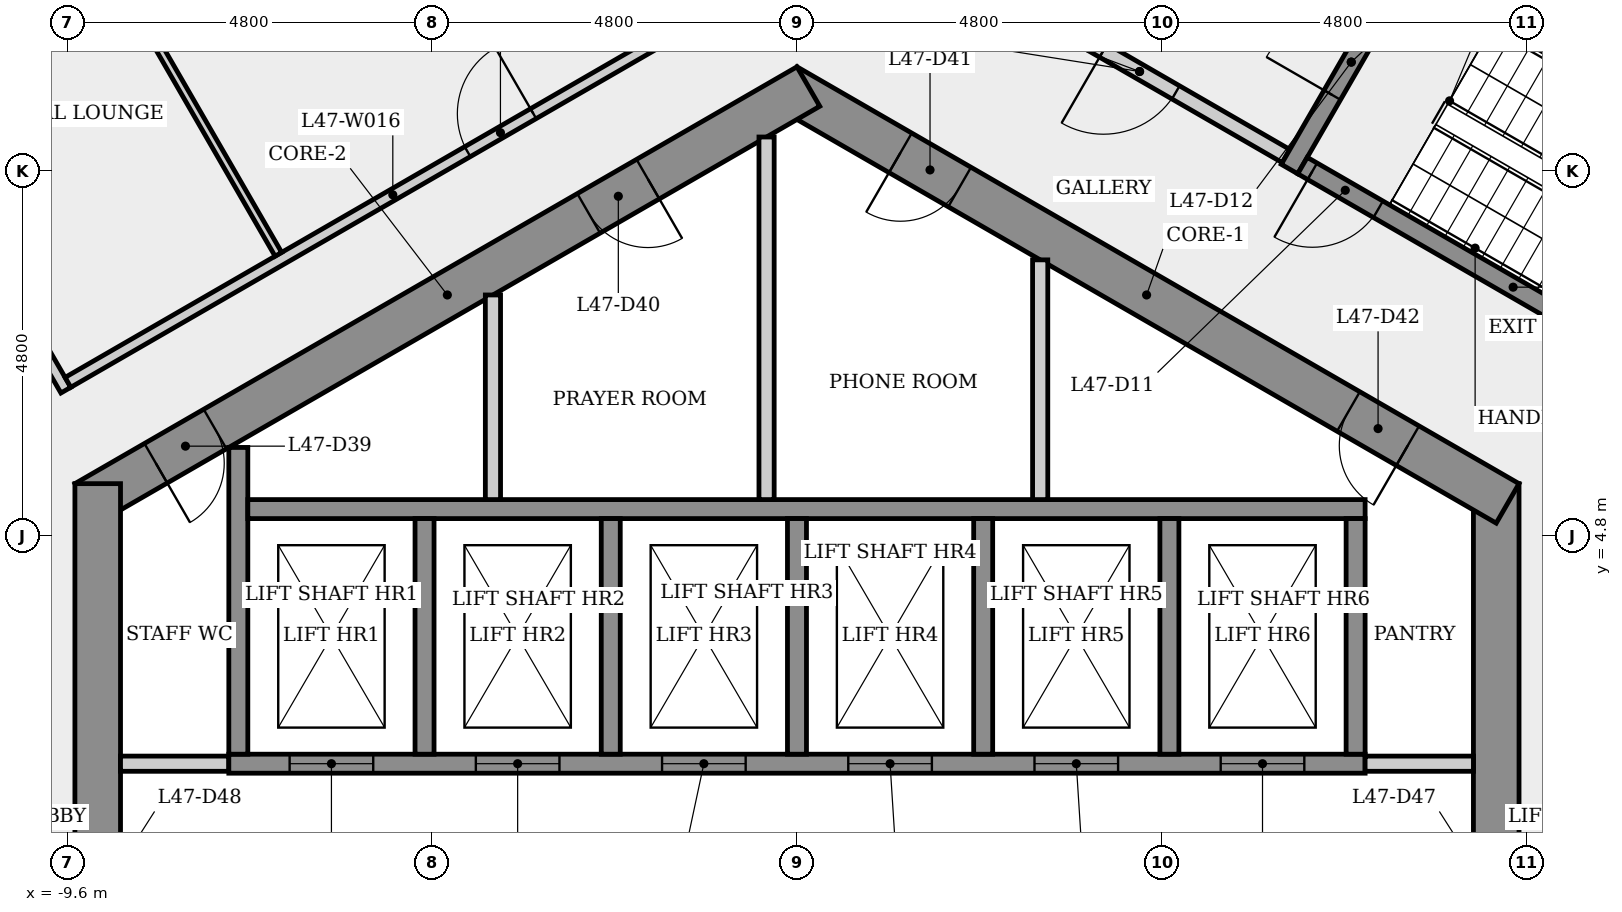
"""IFC4 building model, lengths in metres.
Left out: names, types, materials, properties, quantities, classifications, styles, units other than length and angle.
Written with IfcOpenShell. Run it as: python <this file> out.ifc"""

import sys

from ifc_helpers import new_model, si_unit, direction, frame, frame_2d, origin, place, context, subcontext, project, spatial, rectangle, extrude, element, fill, save


model = new_model("IFC4")
c1 = context("Model", 3, precision=1e-05, world=origin(), true_north=direction((0.0, 1.0)))
c2 = subcontext(c1, "Body", "Model", "MODEL_VIEW")
j1 = project(units=[si_unit("LENGTHUNIT", "METRE"), si_unit("PLANEANGLEUNIT", "RADIAN")], contexts=[c1])
p1 = place(None, origin())
s1 = spatial("IfcSite", under=j1, at=p1, CompositionType="ELEMENT")
p2 = place(p1, origin())
s2 = spatial("IfcBuilding", under=s1, at=p2, CompositionType="ELEMENT")
p3 = place(p2, frame((0.0, 0.0, 176.5)))
s3 = spatial("IfcBuildingStorey", under=s2, at=p3, CompositionType="ELEMENT", Elevation=176.5)
p4 = place(p3, frame((9.2, -5.485, 0.0), z_axis=(0.0, 0.0, 1.0), x_axis=(0.0, 1.0, 0.0)))
e1 = element("IfcWall", 1, at=p4, inside=s3, PredefinedType="SHEAR", context=c2, shape_type="SweptSolid", body=[
    extrude(rectangle(XDim=10.97, YDim=0.6, at=frame_2d((5.485, 0.0))), origin(), (0.0, 0.0, 1.0), 3.4),
])
p5 = place(p4, frame((4.685, 0.0, 0.0)))
e2 = element("IfcOpeningElement", 2, at=p5, cuts=e1, PredefinedType="OPENING", context=c2, shape_type="SweptSolid", body=[
    extrude(rectangle(XDim=1.6, YDim=2.1, at=frame_2d((0.8, 1.05))), frame((0.0, 0.31, 0.0), z_axis=(0.0, -1.0, 0.0), x_axis=(1.0, 0.0, 0.0)), (0.0, 0.0, 1.0), 0.62),
])
p6 = place(p3, frame((9.35, 5.225, 0.0), z_axis=(0.0, 0.0, 1.0), x_axis=(-0.866023993627, 0.500002442456, 0.0)))
e3 = element("IfcWall", 3, at=p6, inside=s3, PredefinedType="SHEAR", context=c2, shape_type="SweptSolid", body=[
    extrude(rectangle(XDim=10.97, YDim=0.6, at=frame_2d((5.485, 0.0))), origin(), (0.0, 0.0, 1.0), 3.4),
])
p7 = place(p6, frame((8.325, 0.0, 0.0)))
e4 = element("IfcOpeningElement", 4, at=p7, cuts=e3, PredefinedType="OPENING", context=c2, shape_type="SweptSolid", body=[
    extrude(rectangle(XDim=0.9, YDim=2.1, at=frame_2d((0.45, 1.05))), frame((0.0, 0.31, 0.0), z_axis=(0.0, -1.0, 0.0), x_axis=(1.0, 0.0, 0.0)), (0.0, 0.0, 1.0), 0.62),
])
p8 = place(p6, frame((1.518, 0.0, 0.0)))
e5 = element("IfcOpeningElement", 5, at=p8, cuts=e3, PredefinedType="OPENING", context=c2, shape_type="SweptSolid", body=[
    extrude(rectangle(XDim=0.9, YDim=2.1, at=frame_2d((0.45, 1.05))), frame((0.0, 0.31, 0.0), z_axis=(0.0, -1.0, 0.0), x_axis=(1.0, 0.0, 0.0)), (0.0, 0.0, 1.0), 0.62),
])
p9 = place(p3, frame((0.15, 10.71, 0.0), z_axis=(0.0, 0.0, 1.0), x_axis=(-0.866023993627, -0.500002442456, 0.0)))
e6 = element("IfcWall", 6, at=p9, inside=s3, PredefinedType="SHEAR", context=c2, shape_type="SweptSolid", body=[
    extrude(rectangle(XDim=10.97, YDim=0.6, at=frame_2d((5.485, 0.0))), origin(), (0.0, 0.0, 1.0), 3.4),
])
p10 = place(p9, frame((9.013, 0.0, 0.0)))
e7 = element("IfcOpeningElement", 7, at=p10, cuts=e6, PredefinedType="OPENING", context=c2, shape_type="SweptSolid", body=[
    extrude(rectangle(XDim=0.9, YDim=2.1, at=frame_2d((0.45, 1.05))), frame((0.0, 0.31, 0.0), z_axis=(0.0, -1.0, 0.0), x_axis=(1.0, 0.0, 0.0)), (0.0, 0.0, 1.0), 0.62),
])
p11 = place(p9, frame((2.437, 0.0, 0.0)))
e8 = element("IfcOpeningElement", 8, at=p11, cuts=e6, PredefinedType="OPENING", context=c2, shape_type="SweptSolid", body=[
    extrude(rectangle(XDim=0.9, YDim=2.1, at=frame_2d((0.45, 1.05))), frame((0.0, 0.31, 0.0), z_axis=(0.0, -1.0, 0.0), x_axis=(1.0, 0.0, 0.0)), (0.0, 0.0, 1.0), 0.62),
])
p12 = place(p3, frame((-9.2, 5.485, 0.0), z_axis=(0.0, 0.0, 1.0), x_axis=(0.0, -1.0, 0.0)))
e9 = element("IfcWall", 9, at=p12, inside=s3, PredefinedType="SHEAR", context=c2, shape_type="SweptSolid", body=[
    extrude(rectangle(XDim=10.97, YDim=0.6, at=frame_2d((5.485, 0.0))), origin(), (0.0, 0.0, 1.0), 3.4),
])
p13 = place(p12, frame((8.516, 0.0, 0.0)))
e10 = element("IfcOpeningElement", 10, at=p13, cuts=e9, PredefinedType="OPENING", context=c2, shape_type="SweptSolid", body=[
    extrude(rectangle(XDim=0.9, YDim=2.1, at=frame_2d((0.45, 1.05))), frame((0.0, 0.31, 0.0), z_axis=(0.0, -1.0, 0.0), x_axis=(1.0, 0.0, 0.0)), (0.0, 0.0, 1.0), 0.62),
])
p14 = place(p12, frame((4.685, 0.0, 0.0)))
e11 = element("IfcOpeningElement", 11, at=p14, cuts=e9, PredefinedType="OPENING", context=c2, shape_type="SweptSolid", body=[
    extrude(rectangle(XDim=1.6, YDim=2.1, at=frame_2d((0.8, 1.05))), frame((0.0, 0.31, 0.0), z_axis=(0.0, -1.0, 0.0), x_axis=(1.0, 0.0, 0.0)), (0.0, 0.0, 1.0), 0.62),
])
p15 = place(p3, frame((-12.127, 11.058, 0.0), z_axis=(0.0, 0.0, 1.0), x_axis=(0.500018842284, -0.866014524914, 0.0)))
e12 = element("IfcWall", 12, at=p15, inside=s3, PredefinedType="PARTITIONING", context=c2, shape_type="SweptSolid", body=[
    extrude(rectangle(XDim=5.015, YDim=0.15, at=frame_2d((2.507, 0.0))), origin(), (0.0, 0.0, 1.0), 3.05),
])
p16 = place(p15, frame((1.97, 0.0, 0.0)))
e13 = element("IfcOpeningElement", 13, at=p16, cuts=e12, PredefinedType="OPENING", context=c2, shape_type="SweptSolid", body=[
    extrude(rectangle(XDim=1.0, YDim=2.1, at=frame_2d((0.5, 1.05))), frame((0.0, 0.085, 0.0), z_axis=(0.0, -1.0, 0.0), x_axis=(1.0, 0.0, 0.0)), (0.0, 0.0, 1.0), 0.17),
])
p17 = place(p3, frame((-9.592, 6.817, 0.0), z_axis=(0.0, 0.0, 1.0), x_axis=(0.866024543535, 0.500001489993, 0.0)))
e14 = element("IfcWall", 14, at=p17, inside=s3, PredefinedType="PARTITIONING", context=c2, shape_type="SweptSolid", body=[
    extrude(rectangle(XDim=9.871, YDim=0.15, at=frame_2d((4.936, 0.0))), origin(), (0.0, 0.0, 1.0), 3.05),
])
p18 = place(p17, frame((6.071, 0.0, 0.0)))
e15 = element("IfcOpeningElement", 15, at=p18, cuts=e14, PredefinedType="OPENING", context=c2, shape_type="SweptSolid", body=[
    extrude(rectangle(XDim=1.0, YDim=2.1, at=frame_2d((0.5, 1.05))), frame((0.0, 0.085, 0.0), z_axis=(0.0, -1.0, 0.0), x_axis=(1.0, 0.0, 0.0)), (0.0, 0.0, 1.0), 0.17),
])
p19 = place(p3, frame((-8.9, 1.8, 0.0), z_axis=(0.0, 0.0, 1.0), x_axis=(1.0, 0.0, 0.0)))
e16 = element("IfcWall", 16, at=p19, inside=s3, PredefinedType="PARTITIONING", context=c2, shape_type="SweptSolid", body=[
    extrude(rectangle(XDim=1.425, YDim=0.2, at=frame_2d((0.712, 0.0))), origin(), (0.0, 0.0, 1.0), 3.05),
])
p20 = place(p3, frame((-7.475, 1.8, 0.0), z_axis=(0.0, 0.0, 1.0), x_axis=(1.0, 0.0, 0.0)))
e17 = element("IfcWall", 17, at=p20, inside=s3, PredefinedType="SHEAR", context=c2, shape_type="SweptSolid", body=[
    extrude(rectangle(XDim=14.95, YDim=0.25, at=frame_2d((7.475, 0.0))), origin(), (0.0, 0.0, 1.0), 3.05),
])
p21 = place(p20, frame((0.8, 0.0, 0.0)))
e18 = element("IfcOpeningElement", 18, at=p21, cuts=e17, PredefinedType="OPENING", context=c2, shape_type="SweptSolid", body=[
    extrude(rectangle(XDim=1.1, YDim=2.1, at=frame_2d((0.55, 1.05))), frame((0.0, 0.135, 0.0), z_axis=(0.0, -1.0, 0.0), x_axis=(1.0, 0.0, 0.0)), (0.0, 0.0, 1.0), 0.27),
])
p22 = place(p20, frame((3.25, 0.0, 0.0)))
e19 = element("IfcOpeningElement", 19, at=p22, cuts=e17, PredefinedType="OPENING", context=c2, shape_type="SweptSolid", body=[
    extrude(rectangle(XDim=1.1, YDim=2.1, at=frame_2d((0.55, 1.05))), frame((0.0, 0.135, 0.0), z_axis=(0.0, -1.0, 0.0), x_axis=(1.0, 0.0, 0.0)), (0.0, 0.0, 1.0), 0.27),
])
p23 = place(p20, frame((5.7, 0.0, 0.0)))
e20 = element("IfcOpeningElement", 20, at=p23, cuts=e17, PredefinedType="OPENING", context=c2, shape_type="SweptSolid", body=[
    extrude(rectangle(XDim=1.1, YDim=2.1, at=frame_2d((0.55, 1.05))), frame((0.0, 0.135, 0.0), z_axis=(0.0, -1.0, 0.0), x_axis=(1.0, 0.0, 0.0)), (0.0, 0.0, 1.0), 0.27),
])
p24 = place(p20, frame((8.15, 0.0, 0.0)))
e21 = element("IfcOpeningElement", 21, at=p24, cuts=e17, PredefinedType="OPENING", context=c2, shape_type="SweptSolid", body=[
    extrude(rectangle(XDim=1.1, YDim=2.1, at=frame_2d((0.55, 1.05))), frame((0.0, 0.135, 0.0), z_axis=(0.0, -1.0, 0.0), x_axis=(1.0, 0.0, 0.0)), (0.0, 0.0, 1.0), 0.27),
])
p25 = place(p20, frame((10.6, 0.0, 0.0)))
e22 = element("IfcOpeningElement", 22, at=p25, cuts=e17, PredefinedType="OPENING", context=c2, shape_type="SweptSolid", body=[
    extrude(rectangle(XDim=1.1, YDim=2.1, at=frame_2d((0.55, 1.05))), frame((0.0, 0.135, 0.0), z_axis=(0.0, -1.0, 0.0), x_axis=(1.0, 0.0, 0.0)), (0.0, 0.0, 1.0), 0.27),
])
p26 = place(p20, frame((13.05, 0.0, 0.0)))
e23 = element("IfcOpeningElement", 23, at=p26, cuts=e17, PredefinedType="OPENING", context=c2, shape_type="SweptSolid", body=[
    extrude(rectangle(XDim=1.1, YDim=2.1, at=frame_2d((0.55, 1.05))), frame((0.0, 0.135, 0.0), z_axis=(0.0, -1.0, 0.0), x_axis=(1.0, 0.0, 0.0)), (0.0, 0.0, 1.0), 0.27),
])
p27 = place(p3, frame((-7.35, 1.925, 0.0), z_axis=(0.0, 0.0, 1.0), x_axis=(0.0, 1.0, 0.0)))
e24 = element("IfcWall", 24, at=p27, inside=s3, PredefinedType="SHEAR", context=c2, shape_type="SweptSolid", body=[
    extrude(rectangle(XDim=4.036, YDim=0.25, at=frame_2d((2.018, 0.0))), origin(), (0.0, 0.0, 1.0), 3.05),
])
p28 = place(p3, frame((-7.225, 5.15, 0.0), z_axis=(0.0, 0.0, 1.0), x_axis=(1.0, 0.0, 0.0)))
e25 = element("IfcWall", 25, at=p28, inside=s3, PredefinedType="SHEAR", context=c2, shape_type="SweptSolid", body=[
    extrude(rectangle(XDim=14.7, YDim=0.25, at=frame_2d((7.35, 0.0))), origin(), (0.0, 0.0, 1.0), 3.05),
])
p29 = place(p3, frame((-6.823, 8.503, 0.0), z_axis=(0.0, 0.0, 1.0), x_axis=(-0.500011399757, 0.866018822032, 0.0)))
e26 = element("IfcWall", 26, at=p29, inside=s3, PredefinedType="PARTITIONING", context=c2, shape_type="SweptSolid", body=[
    extrude(rectangle(XDim=7.411, YDim=0.1, at=frame_2d((3.706, 0.0))), origin(), (0.0, 0.0, 1.0), 3.05),
])
p30 = place(p3, frame((-4.9, 5.025, 0.0), z_axis=(0.0, 0.0, 1.0), x_axis=(0.0, -1.0, 0.0)))
e27 = element("IfcWall", 27, at=p30, inside=s3, PredefinedType="SHEAR", context=c2, shape_type="SweptSolid", body=[
    extrude(rectangle(XDim=3.1, YDim=0.25, at=frame_2d((1.55, 0.0))), origin(), (0.0, 0.0, 1.0), 3.4),
])
p31 = place(p3, frame((-4.0, 7.967, 0.0), z_axis=(0.0, 0.0, 1.0), x_axis=(0.0, -1.0, 0.0)))
e28 = element("IfcWall", 28, at=p31, inside=s3, PredefinedType="PARTITIONING", context=c2, shape_type="SweptSolid", body=[
    extrude(rectangle(XDim=2.692, YDim=0.2, at=frame_2d((1.346, 0.0))), origin(), (0.0, 0.0, 1.0), 3.05),
])
p32 = place(p3, frame((-2.45, 5.025, 0.0), z_axis=(0.0, 0.0, 1.0), x_axis=(0.0, -1.0, 0.0)))
e29 = element("IfcWall", 29, at=p32, inside=s3, PredefinedType="SHEAR", context=c2, shape_type="SweptSolid", body=[
    extrude(rectangle(XDim=3.1, YDim=0.25, at=frame_2d((1.55, 0.0))), origin(), (0.0, 0.0, 1.0), 3.4),
])
p33 = place(p3, frame((-0.4, 10.046, 0.0), z_axis=(0.0, 0.0, 1.0), x_axis=(0.0, -1.0, 0.0)))
e30 = element("IfcWall", 30, at=p33, inside=s3, PredefinedType="PARTITIONING", context=c2, shape_type="SweptSolid", body=[
    extrude(rectangle(XDim=4.771, YDim=0.2, at=frame_2d((2.385, 0.0))), origin(), (0.0, 0.0, 1.0), 3.05),
])
for number, where, z_axis, x_axis in (
    (31, (0.0, 5.025, 0.0), (0.0, 0.0, 1.0), (0.0, -1.0, 0.0)),
    (32, (2.45, 5.025, 0.0), (0.0, 0.0, 1.0), (0.0, -1.0, 0.0)),
):
    element("IfcWall", number, at=place(p3, frame(where, z_axis=z_axis, x_axis=x_axis)), inside=s3, PredefinedType="SHEAR", context=c2, shape_type="SweptSolid", body=[
        extrude(rectangle(XDim=3.1, YDim=0.25, at=frame_2d((1.55, 0.0))), origin(), (0.0, 0.0, 1.0), 3.4),
    ])
p34 = place(p3, frame((3.2, 8.429, 0.0), z_axis=(0.0, 0.0, 1.0), x_axis=(0.0, -1.0, 0.0)))
e33 = element("IfcWall", 33, at=p34, inside=s3, PredefinedType="PARTITIONING", context=c2, shape_type="SweptSolid", body=[
    extrude(rectangle(XDim=3.154, YDim=0.2, at=frame_2d((1.577, 0.0))), origin(), (0.0, 0.0, 1.0), 3.05),
])
p35 = place(p3, frame((4.9, 5.025, 0.0), z_axis=(0.0, 0.0, 1.0), x_axis=(0.0, -1.0, 0.0)))
e34 = element("IfcWall", 34, at=p35, inside=s3, PredefinedType="SHEAR", context=c2, shape_type="SweptSolid", body=[
    extrude(rectangle(XDim=3.1, YDim=0.25, at=frame_2d((1.55, 0.0))), origin(), (0.0, 0.0, 1.0), 3.4),
])
p36 = place(p3, frame((6.435, 9.795, 0.0), z_axis=(0.0, 0.0, 1.0), x_axis=(-0.866012907634, 0.500021643343, 0.0)))
e35 = element("IfcWall", 35, at=p36, inside=s3, PredefinedType="PARTITIONING", context=c2, shape_type="SweptSolid", body=[
    extrude(rectangle(XDim=4.45, YDim=0.2, at=frame_2d((2.225, 0.0))), origin(), (0.0, 0.0, 1.0), 3.05),
])
p37 = place(p36, frame((1.675, 0.0, 0.0)))
e36 = element("IfcOpeningElement", 36, at=p37, cuts=e35, PredefinedType="OPENING", context=c2, shape_type="SweptSolid", body=[
    extrude(rectangle(XDim=1.1, YDim=2.1, at=frame_2d((0.55, 1.05))), frame((0.0, 0.11, 0.0), z_axis=(0.0, -1.0, 0.0), x_axis=(1.0, 0.0, 0.0)), (0.0, 0.0, 1.0), 0.22),
])
p38 = place(p3, frame((6.48, 9.624, 0.0), z_axis=(0.0, 0.0, 1.0), x_axis=(0.500017246033, 0.866015446554, 0.0)))
e37 = element("IfcWall", 37, at=p38, inside=s3, PredefinedType="SHEAR", context=c2, shape_type="SweptSolid", body=[
    extrude(rectangle(XDim=3.25, YDim=0.25, at=frame_2d((1.625, 0.0))), origin(), (0.0, 0.0, 1.0), 3.05),
])
p39 = place(p38, frame((1.125, 0.0, 0.0)))
e38 = element("IfcOpeningElement", 38, at=p39, cuts=e37, PredefinedType="OPENING", context=c2, shape_type="SweptSolid", body=[
    extrude(rectangle(XDim=1.0, YDim=2.1, at=frame_2d((0.5, 1.05))), frame((0.0, 0.135, 0.0), z_axis=(0.0, -1.0, 0.0), x_axis=(1.0, 0.0, 0.0)), (0.0, 0.0, 1.0), 0.27),
])
p40 = place(p3, frame((7.475, 1.8, 0.0), z_axis=(0.0, 0.0, 1.0), x_axis=(1.0, 0.0, 0.0)))
e39 = element("IfcWall", 39, at=p40, inside=s3, PredefinedType="PARTITIONING", context=c2, shape_type="SweptSolid", body=[
    extrude(rectangle(XDim=1.425, YDim=0.2, at=frame_2d((0.712, 0.0))), origin(), (0.0, 0.0, 1.0), 3.05),
])
p41 = place(p3, frame((7.35, 5.025, 0.0), z_axis=(0.0, 0.0, 1.0), x_axis=(0.0, -1.0, 0.0)))
e40 = element("IfcWall", 40, at=p41, inside=s3, PredefinedType="SHEAR", context=c2, shape_type="SweptSolid", body=[
    extrude(rectangle(XDim=3.1, YDim=0.25, at=frame_2d((1.55, 0.0))), origin(), (0.0, 0.0, 1.0), 3.4),
])
p42 = place(p3, frame((8.151, 12.268, 0.0), z_axis=(0.0, 0.0, 1.0), x_axis=(0.866025499775, -0.499999833739, 0.0)))
e41 = element("IfcWall", 41, at=p42, inside=s3, PredefinedType="SHEAR", context=c2, shape_type="SweptSolid", body=[
    extrude(rectangle(XDim=6.4, YDim=0.25, at=frame_2d((3.2, 0.0))), origin(), (0.0, 0.0, 1.0), 3.05),
])
p43 = place(p3, frame((12.194, 6.47, 0.0), z_axis=(0.0, 0.0, 1.0), x_axis=(-0.866025499775, 0.499999833739, 0.0)))
e42 = element("IfcWall", 42, at=p43, inside=s3, PredefinedType="SHEAR", context=c2, shape_type="SweptSolid", body=[
    extrude(rectangle(XDim=6.4, YDim=0.25, at=frame_2d((3.2, 0.0))), origin(), (0.0, 0.0, 1.0), 3.05),
])
p44 = place(p43, frame((5.25, 0.0, 0.0)))
e43 = element("IfcOpeningElement", 43, at=p44, cuts=e42, PredefinedType="OPENING", context=c2, shape_type="SweptSolid", body=[
    extrude(rectangle(XDim=1.0, YDim=2.1, at=frame_2d((0.5, 1.05))), frame((0.0, 0.135, 0.0), z_axis=(0.0, -1.0, 0.0), x_axis=(1.0, 0.0, 0.0)), (0.0, 0.0, 1.0), 0.27),
])
p45 = place(p21, origin())
e44 = element("IfcDoor", 44, at=p45, inside=s3, OperationType="SLIDING_TO_LEFT", PredefinedType="DOOR", context=c2, shape_type="SweptSolid", body=[
    extrude(rectangle(XDim=1.1, YDim=2.1, at=frame_2d((0.55, 1.05))), frame((0.0, 0.025, 0.0), z_axis=(0.0, -1.0, 0.0), x_axis=(1.0, 0.0, 0.0)), (0.0, 0.0, 1.0), 0.05),
])
fill(e18, e44)
p46 = place(p22, origin())
e45 = element("IfcDoor", 45, at=p46, inside=s3, OperationType="SLIDING_TO_LEFT", PredefinedType="DOOR", context=c2, shape_type="SweptSolid", body=[
    extrude(rectangle(XDim=1.1, YDim=2.1, at=frame_2d((0.55, 1.05))), frame((0.0, 0.025, 0.0), z_axis=(0.0, -1.0, 0.0), x_axis=(1.0, 0.0, 0.0)), (0.0, 0.0, 1.0), 0.05),
])
fill(e19, e45)
p47 = place(p23, origin())
e46 = element("IfcDoor", 46, at=p47, inside=s3, OperationType="SLIDING_TO_LEFT", PredefinedType="DOOR", context=c2, shape_type="SweptSolid", body=[
    extrude(rectangle(XDim=1.1, YDim=2.1, at=frame_2d((0.55, 1.05))), frame((0.0, 0.025, 0.0), z_axis=(0.0, -1.0, 0.0), x_axis=(1.0, 0.0, 0.0)), (0.0, 0.0, 1.0), 0.05),
])
fill(e20, e46)
p48 = place(p24, origin())
e47 = element("IfcDoor", 47, at=p48, inside=s3, OperationType="SLIDING_TO_LEFT", PredefinedType="DOOR", context=c2, shape_type="SweptSolid", body=[
    extrude(rectangle(XDim=1.1, YDim=2.1, at=frame_2d((0.55, 1.05))), frame((0.0, 0.025, 0.0), z_axis=(0.0, -1.0, 0.0), x_axis=(1.0, 0.0, 0.0)), (0.0, 0.0, 1.0), 0.05),
])
fill(e21, e47)
p49 = place(p25, origin())
e48 = element("IfcDoor", 48, at=p49, inside=s3, OperationType="SLIDING_TO_LEFT", PredefinedType="DOOR", context=c2, shape_type="SweptSolid", body=[
    extrude(rectangle(XDim=1.1, YDim=2.1, at=frame_2d((0.55, 1.05))), frame((0.0, 0.025, 0.0), z_axis=(0.0, -1.0, 0.0), x_axis=(1.0, 0.0, 0.0)), (0.0, 0.0, 1.0), 0.05),
])
fill(e22, e48)
p50 = place(p26, origin())
e49 = element("IfcDoor", 49, at=p50, inside=s3, OperationType="SLIDING_TO_LEFT", PredefinedType="DOOR", context=c2, shape_type="SweptSolid", body=[
    extrude(rectangle(XDim=1.1, YDim=2.1, at=frame_2d((0.55, 1.05))), frame((0.0, 0.025, 0.0), z_axis=(0.0, -1.0, 0.0), x_axis=(1.0, 0.0, 0.0)), (0.0, 0.0, 1.0), 0.05),
])
fill(e23, e49)
p51 = place(p44, origin())
e50 = element("IfcDoor", 50, at=p51, inside=s3, OperationType="SINGLE_SWING_RIGHT", PredefinedType="DOOR", context=c2, shape_type="SweptSolid", body=[
    extrude(rectangle(XDim=1.0, YDim=2.1, at=frame_2d((0.5, 1.05))), frame((0.0, 0.025, 0.0), z_axis=(0.0, -1.0, 0.0), x_axis=(1.0, 0.0, 0.0)), (0.0, 0.0, 1.0), 0.05),
])
fill(e43, e50)
p52 = place(p39, origin())
e51 = element("IfcDoor", 51, at=p52, inside=s3, OperationType="SINGLE_SWING_LEFT", PredefinedType="DOOR", context=c2, shape_type="SweptSolid", body=[
    extrude(rectangle(XDim=1.0, YDim=2.1, at=frame_2d((0.5, 1.05))), frame((0.0, 0.025, 0.0), z_axis=(0.0, -1.0, 0.0), x_axis=(1.0, 0.0, 0.0)), (0.0, 0.0, 1.0), 0.05),
])
fill(e38, e51)
p53 = place(p37, origin())
e52 = element("IfcDoor", 52, at=p53, inside=s3, OperationType="SINGLE_SWING_RIGHT", PredefinedType="DOOR", context=c2, shape_type="SweptSolid", body=[
    extrude(rectangle(XDim=1.1, YDim=2.1, at=frame_2d((0.55, 1.05))), frame((0.0, 0.025, 0.0), z_axis=(0.0, -1.0, 0.0), x_axis=(1.0, 0.0, 0.0)), (0.0, 0.0, 1.0), 0.05),
])
fill(e36, e52)
p54 = place(p18, origin())
e53 = element("IfcDoor", 53, at=p54, inside=s3, OperationType="SINGLE_SWING_RIGHT", PredefinedType="DOOR", context=c2, shape_type="SweptSolid", body=[
    extrude(rectangle(XDim=1.0, YDim=2.1, at=frame_2d((0.5, 1.05))), frame((0.0, 0.025, 0.0), z_axis=(0.0, -1.0, 0.0), x_axis=(1.0, 0.0, 0.0)), (0.0, 0.0, 1.0), 0.05),
])
fill(e15, e53)
p55 = place(p10, origin())
e54 = element("IfcDoor", 54, at=p55, inside=s3, OperationType="SINGLE_SWING_RIGHT", PredefinedType="DOOR", context=c2, shape_type="SweptSolid", body=[
    extrude(rectangle(XDim=0.9, YDim=2.1, at=frame_2d((0.45, 1.05))), frame((0.0, 0.025, 0.0), z_axis=(0.0, -1.0, 0.0), x_axis=(1.0, 0.0, 0.0)), (0.0, 0.0, 1.0), 0.05),
])
fill(e7, e54)
p56 = place(p11, origin())
e55 = element("IfcDoor", 55, at=p56, inside=s3, OperationType="SINGLE_SWING_LEFT", PredefinedType="DOOR", context=c2, shape_type="SweptSolid", body=[
    extrude(rectangle(XDim=0.9, YDim=2.1, at=frame_2d((0.45, 1.05))), frame((0.0, 0.025, 0.0), z_axis=(0.0, -1.0, 0.0), x_axis=(1.0, 0.0, 0.0)), (0.0, 0.0, 1.0), 0.05),
])
fill(e8, e55)
p57 = place(p7, origin())
e56 = element("IfcDoor", 56, at=p57, inside=s3, OperationType="SINGLE_SWING_RIGHT", PredefinedType="DOOR", context=c2, shape_type="SweptSolid", body=[
    extrude(rectangle(XDim=0.9, YDim=2.1, at=frame_2d((0.45, 1.05))), frame((0.0, 0.025, 0.0), z_axis=(0.0, -1.0, 0.0), x_axis=(1.0, 0.0, 0.0)), (0.0, 0.0, 1.0), 0.05),
])
fill(e4, e56)
p58 = place(p8, origin())
e57 = element("IfcDoor", 57, at=p58, inside=s3, OperationType="SINGLE_SWING_LEFT", PredefinedType="DOOR", context=c2, shape_type="SweptSolid", body=[
    extrude(rectangle(XDim=0.9, YDim=2.1, at=frame_2d((0.45, 1.05))), frame((0.0, 0.025, 0.0), z_axis=(0.0, -1.0, 0.0), x_axis=(1.0, 0.0, 0.0)), (0.0, 0.0, 1.0), 0.05),
])
fill(e5, e57)
save(model, sys.argv[1])
